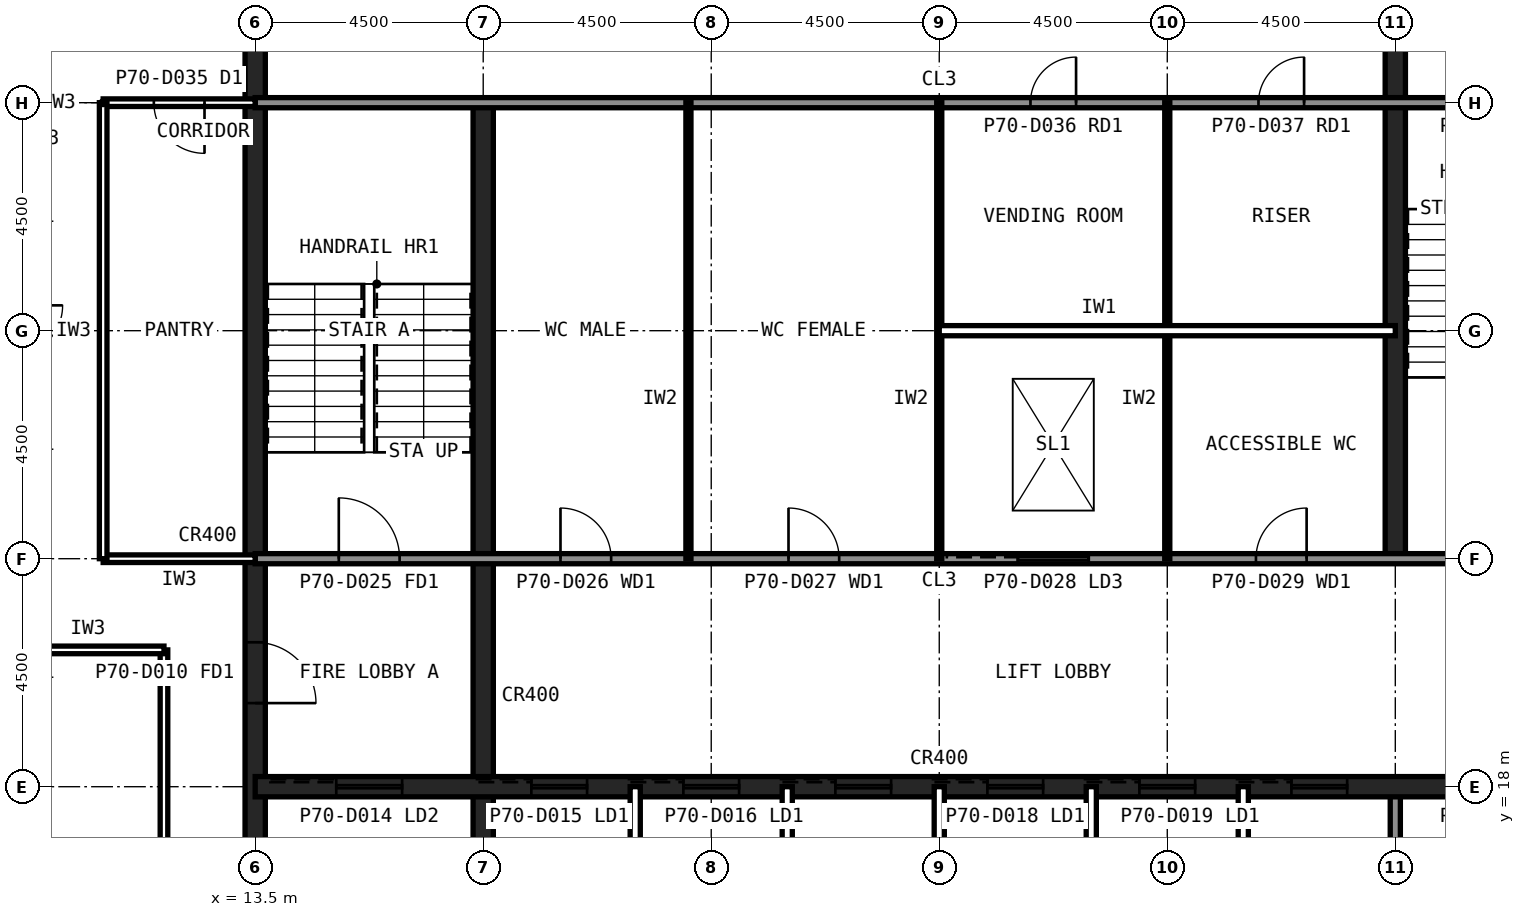
"""IFC4 building model, lengths in metres.
Left out: names, types, materials, properties, quantities, classifications, styles, units other than length and angle.
Written with IfcOpenShell. Run it as: python <this file> out.ifc"""

import sys

from ifc_helpers import new_model, si_unit, direction, frame, frame_2d, origin, place, context, subcontext, project, spatial, rectangle, extrude, element, fill, save


model = new_model("IFC4")
c1 = context("Model", 3, precision=1e-05, world=origin(), true_north=direction((0.0, 1.0)))
c2 = subcontext(c1, "Body", "Model", "MODEL_VIEW")
j1 = project(units=[si_unit("LENGTHUNIT", "METRE"), si_unit("PLANEANGLEUNIT", "RADIAN")], contexts=[c1])
p1 = place(None, origin())
s1 = spatial("IfcSite", under=j1, at=p1, CompositionType="ELEMENT")
p2 = place(p1, origin())
s2 = spatial("IfcBuilding", under=s1, at=p2, CompositionType="ELEMENT")
p3 = place(p2, frame((0.0, 0.0, 294.6)))
s3 = spatial("IfcBuildingStorey", under=s2, at=p3, CompositionType="ELEMENT", Elevation=294.6)
p4 = place(p3, frame((13.5, 40.5, 0.0), z_axis=(0.0, 0.0, 1.0), x_axis=(0.0, -1.0, 0.0)))
e1 = element("IfcWall", 1, at=p4, inside=s3, PredefinedType="SHEAR", context=c2, shape_type="SweptSolid", body=[
    extrude(rectangle(XDim=27.0, YDim=0.4, at=frame_2d((13.5, 0.0))), origin(), (0.0, 0.0, 1.0), 4.0),
])
p5 = place(p4, frame((19.65, 0.0, 0.0)))
e2 = element("IfcOpeningElement", 2, at=p5, cuts=e1, PredefinedType="OPENING", context=c2, shape_type="SweptSolid", body=[
    extrude(rectangle(XDim=1.2, YDim=2.1, at=frame_2d((0.6, 1.05))), frame((0.0, 0.21, 0.0), z_axis=(0.0, -1.0, 0.0), x_axis=(1.0, 0.0, 0.0)), (0.0, 0.0, 1.0), 0.42),
])
p6 = place(p4, frame((5.85, 0.0, 0.0)))
e3 = element("IfcOpeningElement", 3, at=p6, cuts=e1, PredefinedType="OPENING", context=c2, shape_type="SweptSolid", body=[
    extrude(rectangle(XDim=1.8, YDim=2.1, at=frame_2d((0.9, 1.05))), frame((0.0, 0.21, 0.0), z_axis=(0.0, -1.0, 0.0), x_axis=(1.0, 0.0, 0.0)), (0.0, 0.0, 1.0), 0.42),
])
p7 = place(p3, frame((18.0, 13.5, 0.0), z_axis=(0.0, 0.0, 1.0), x_axis=(0.0, 1.0, 0.0)))
e4 = element("IfcWall", 4, at=p7, inside=s3, PredefinedType="SHEAR", context=c2, shape_type="SweptSolid", body=[
    extrude(rectangle(XDim=18.0, YDim=0.4, at=frame_2d((9.0, 0.0))), origin(), (0.0, 0.0, 1.0), 4.0),
])
p8 = place(p3, frame((36.0, 13.5, 0.0), z_axis=(0.0, 0.0, 1.0), x_axis=(0.0, 1.0, 0.0)))
e5 = element("IfcWall", 5, at=p8, inside=s3, PredefinedType="SOLIDWALL", context=c2, shape_type="SweptSolid", body=[
    extrude(rectangle(XDim=4.5, YDim=0.2, at=frame_2d((2.25, 0.0))), origin(), (0.0, 0.0, 1.0), 3.84),
])
p9 = place(p3, frame((36.0, 22.5, 0.0), z_axis=(0.0, 0.0, 1.0), x_axis=(0.0, 1.0, 0.0)))
e6 = element("IfcWall", 6, at=p9, inside=s3, PredefinedType="SHEAR", context=c2, shape_type="SweptSolid", body=[
    extrude(rectangle(XDim=18.0, YDim=0.4, at=frame_2d((9.0, 0.0))), origin(), (0.0, 0.0, 1.0), 4.0),
])
p10 = place(p3, frame((13.5, 18.0, 0.0), z_axis=(0.0, 0.0, 1.0), x_axis=(1.0, 0.0, 0.0)))
e7 = element("IfcWall", 7, at=p10, inside=s3, PredefinedType="SHEAR", context=c2, shape_type="SweptSolid", body=[
    extrude(rectangle(XDim=27.0, YDim=0.4, at=frame_2d((13.5, 0.0))), origin(), (0.0, 0.0, 1.0), 4.0),
])
p11 = place(p10, frame((24.3, 0.0, 0.0)))
e8 = element("IfcOpeningElement", 8, at=p11, cuts=e7, PredefinedType="OPENING", context=c2, shape_type="SweptSolid", body=[
    extrude(rectangle(XDim=0.9, YDim=2.1, at=frame_2d((0.45, 1.05))), frame((0.0, 0.21, 0.0), z_axis=(0.0, -1.0, 0.0), x_axis=(1.0, 0.0, 0.0)), (0.0, 0.0, 1.0), 0.42),
])
p12 = place(p10, frame((5.45, 0.0, 0.0)))
e9 = element("IfcOpeningElement", 9, at=p12, cuts=e7, PredefinedType="OPENING", context=c2, shape_type="SweptSolid", body=[
    extrude(rectangle(XDim=1.1, YDim=2.1, at=frame_2d((0.55, 1.05))), frame((0.0, 0.21, 0.0), z_axis=(0.0, -1.0, 0.0), x_axis=(1.0, 0.0, 0.0)), (0.0, 0.0, 1.0), 0.42),
])
p13 = place(p10, frame((8.45, 0.0, 0.0)))
e10 = element("IfcOpeningElement", 10, at=p13, cuts=e7, PredefinedType="OPENING", context=c2, shape_type="SweptSolid", body=[
    extrude(rectangle(XDim=1.1, YDim=2.1, at=frame_2d((0.55, 1.05))), frame((0.0, 0.21, 0.0), z_axis=(0.0, -1.0, 0.0), x_axis=(1.0, 0.0, 0.0)), (0.0, 0.0, 1.0), 0.42),
])
p14 = place(p10, frame((11.45, 0.0, 0.0)))
e11 = element("IfcOpeningElement", 11, at=p14, cuts=e7, PredefinedType="OPENING", context=c2, shape_type="SweptSolid", body=[
    extrude(rectangle(XDim=1.1, YDim=2.1, at=frame_2d((0.55, 1.05))), frame((0.0, 0.21, 0.0), z_axis=(0.0, -1.0, 0.0), x_axis=(1.0, 0.0, 0.0)), (0.0, 0.0, 1.0), 0.42),
])
p15 = place(p10, frame((14.45, 0.0, 0.0)))
e12 = element("IfcOpeningElement", 12, at=p15, cuts=e7, PredefinedType="OPENING", context=c2, shape_type="SweptSolid", body=[
    extrude(rectangle(XDim=1.1, YDim=2.1, at=frame_2d((0.55, 1.05))), frame((0.0, 0.21, 0.0), z_axis=(0.0, -1.0, 0.0), x_axis=(1.0, 0.0, 0.0)), (0.0, 0.0, 1.0), 0.42),
])
p16 = place(p10, frame((17.45, 0.0, 0.0)))
e13 = element("IfcOpeningElement", 13, at=p16, cuts=e7, PredefinedType="OPENING", context=c2, shape_type="SweptSolid", body=[
    extrude(rectangle(XDim=1.1, YDim=2.1, at=frame_2d((0.55, 1.05))), frame((0.0, 0.21, 0.0), z_axis=(0.0, -1.0, 0.0), x_axis=(1.0, 0.0, 0.0)), (0.0, 0.0, 1.0), 0.42),
])
p17 = place(p10, frame((20.45, 0.0, 0.0)))
e14 = element("IfcOpeningElement", 14, at=p17, cuts=e7, PredefinedType="OPENING", context=c2, shape_type="SweptSolid", body=[
    extrude(rectangle(XDim=1.1, YDim=2.1, at=frame_2d((0.55, 1.05))), frame((0.0, 0.21, 0.0), z_axis=(0.0, -1.0, 0.0), x_axis=(1.0, 0.0, 0.0)), (0.0, 0.0, 1.0), 0.42),
])
p18 = place(p10, frame((1.6, 0.0, 0.0)))
e15 = element("IfcOpeningElement", 15, at=p18, cuts=e7, PredefinedType="OPENING", context=c2, shape_type="SweptSolid", body=[
    extrude(rectangle(XDim=1.3, YDim=2.2, at=frame_2d((0.65, 1.1))), frame((0.0, 0.21, 0.0), z_axis=(0.0, -1.0, 0.0), x_axis=(1.0, 0.0, 0.0)), (0.0, 0.0, 1.0), 0.42),
])
p19 = place(p3, frame((13.5, 22.5, 0.0), z_axis=(0.0, 0.0, 1.0), x_axis=(1.0, 0.0, 0.0)))
e16 = element("IfcWall", 16, at=p19, inside=s3, PredefinedType="SOLIDWALL", context=c2, shape_type="SweptSolid", body=[
    extrude(rectangle(XDim=27.0, YDim=0.2, at=frame_2d((13.5, 0.0))), origin(), (0.0, 0.0, 1.0), 3.84),
])
p20 = place(p19, frame((1.65, 0.0, 0.0)))
e17 = element("IfcOpeningElement", 17, at=p20, cuts=e16, PredefinedType="OPENING", context=c2, shape_type="SweptSolid", body=[
    extrude(rectangle(XDim=1.2, YDim=2.1, at=frame_2d((0.6, 1.05))), frame((0.0, 0.11, 0.0), z_axis=(0.0, -1.0, 0.0), x_axis=(1.0, 0.0, 0.0)), (0.0, 0.0, 1.0), 0.22),
])
p21 = place(p19, frame((6.025, 0.0, 0.0)))
e18 = element("IfcOpeningElement", 18, at=p21, cuts=e16, PredefinedType="OPENING", context=c2, shape_type="SweptSolid", body=[
    extrude(rectangle(XDim=1.0, YDim=2.1, at=frame_2d((0.5, 1.05))), frame((0.0, 0.11, 0.0), z_axis=(0.0, -1.0, 0.0), x_axis=(1.0, 0.0, 0.0)), (0.0, 0.0, 1.0), 0.22),
])
p22 = place(p19, frame((10.525, 0.0, 0.0)))
e19 = element("IfcOpeningElement", 19, at=p22, cuts=e16, PredefinedType="OPENING", context=c2, shape_type="SweptSolid", body=[
    extrude(rectangle(XDim=1.0, YDim=2.1, at=frame_2d((0.5, 1.05))), frame((0.0, 0.11, 0.0), z_axis=(0.0, -1.0, 0.0), x_axis=(1.0, 0.0, 0.0)), (0.0, 0.0, 1.0), 0.22),
])
p23 = place(p19, frame((19.75, 0.0, 0.0)))
e20 = element("IfcOpeningElement", 20, at=p23, cuts=e16, PredefinedType="OPENING", context=c2, shape_type="SweptSolid", body=[
    extrude(rectangle(XDim=1.0, YDim=2.1, at=frame_2d((0.5, 1.05))), frame((0.0, 0.11, 0.0), z_axis=(0.0, -1.0, 0.0), x_axis=(1.0, 0.0, 0.0)), (0.0, 0.0, 1.0), 0.22),
])
p24 = place(p19, frame((15.05, 0.0, 0.0)))
e21 = element("IfcOpeningElement", 21, at=p24, cuts=e16, PredefinedType="OPENING", context=c2, shape_type="SweptSolid", body=[
    extrude(rectangle(XDim=1.4, YDim=2.4, at=frame_2d((0.7, 1.2))), frame((0.0, 0.11, 0.0), z_axis=(0.0, -1.0, 0.0), x_axis=(1.0, 0.0, 0.0)), (0.0, 0.0, 1.0), 0.22),
])
p25 = place(p3, frame((13.5, 31.5, 0.0), z_axis=(0.0, 0.0, 1.0), x_axis=(1.0, 0.0, 0.0)))
e22 = element("IfcWall", 22, at=p25, inside=s3, PredefinedType="SOLIDWALL", context=c2, shape_type="SweptSolid", body=[
    extrude(rectangle(XDim=27.0, YDim=0.2, at=frame_2d((13.5, 0.0))), origin(), (0.0, 0.0, 1.0), 3.84),
])
p26 = place(p25, frame((24.15, 0.0, 0.0)))
e23 = element("IfcOpeningElement", 23, at=p26, cuts=e22, PredefinedType="OPENING", context=c2, shape_type="SweptSolid", body=[
    extrude(rectangle(XDim=1.2, YDim=2.1, at=frame_2d((0.6, 1.05))), frame((0.0, 0.11, 0.0), z_axis=(0.0, -1.0, 0.0), x_axis=(1.0, 0.0, 0.0)), (0.0, 0.0, 1.0), 0.22),
])
p27 = place(p25, frame((15.3, 0.0, 0.0)))
e24 = element("IfcOpeningElement", 24, at=p27, cuts=e22, PredefinedType="OPENING", context=c2, shape_type="SweptSolid", body=[
    extrude(rectangle(XDim=0.9, YDim=2.1, at=frame_2d((0.45, 1.05))), frame((0.0, 0.11, 0.0), z_axis=(0.0, -1.0, 0.0), x_axis=(1.0, 0.0, 0.0)), (0.0, 0.0, 1.0), 0.22),
])
p28 = place(p25, frame((19.8, 0.0, 0.0)))
e25 = element("IfcOpeningElement", 25, at=p28, cuts=e22, PredefinedType="OPENING", context=c2, shape_type="SweptSolid", body=[
    extrude(rectangle(XDim=0.9, YDim=2.1, at=frame_2d((0.45, 1.05))), frame((0.0, 0.11, 0.0), z_axis=(0.0, -1.0, 0.0), x_axis=(1.0, 0.0, 0.0)), (0.0, 0.0, 1.0), 0.22),
])
for number, where, z_axis, x_axis in (
    (26, (21.0, 13.5, 0.0), (0.0, 0.0, 1.0), (0.0, 1.0, 0.0)),
    (27, (24.0, 13.5, 0.0), (0.0, 0.0, 1.0), (0.0, 1.0, 0.0)),
    (28, (27.0, 13.5, 0.0), (0.0, 0.0, 1.0), (0.0, 1.0, 0.0)),
    (29, (30.0, 13.5, 0.0), (0.0, 0.0, 1.0), (0.0, 1.0, 0.0)),
    (30, (33.0, 13.5, 0.0), (0.0, 0.0, 1.0), (0.0, 1.0, 0.0)),
):
    element("IfcWall", number, at=place(p3, frame(where, z_axis=z_axis, x_axis=x_axis)), inside=s3, PredefinedType="PARTITIONING", context=c2, shape_type="SweptSolid", body=[
        extrude(rectangle(XDim=4.5, YDim=0.2, at=frame_2d((2.25, 0.0))), origin(), (0.0, 0.0, 1.0), 3.84),
    ])
for number, where, z_axis, x_axis in (
    (31, (22.05, 22.5, 0.0), (0.0, 0.0, 1.0), (0.0, 1.0, 0.0)),
    (32, (27.0, 22.5, 0.0), (0.0, 0.0, 1.0), (0.0, 1.0, 0.0)),
    (33, (31.5, 22.5, 0.0), (0.0, 0.0, 1.0), (0.0, 1.0, 0.0)),
):
    element("IfcWall", number, at=place(p3, frame(where, z_axis=z_axis, x_axis=x_axis)), inside=s3, PredefinedType="PLUMBINGWALL", context=c2, shape_type="SweptSolid", body=[
        extrude(rectangle(XDim=9.0, YDim=0.1, at=frame_2d((4.5, 0.0))), origin(), (0.0, 0.0, 1.0), 3.84),
    ])
p29 = place(p3, frame((27.0, 27.0, 0.0), z_axis=(0.0, 0.0, 1.0), x_axis=(1.0, 0.0, 0.0)))
e34 = element("IfcWall", 34, at=p29, inside=s3, PredefinedType="PARTITIONING", context=c2, shape_type="SweptSolid", body=[
    extrude(rectangle(XDim=9.0, YDim=0.2, at=frame_2d((4.5, 0.0))), origin(), (0.0, 0.0, 1.0), 3.84),
])
p30 = place(p3, frame((11.7, 20.7, 0.0), z_axis=(0.0, 0.0, 1.0), x_axis=(0.0, -1.0, 0.0)))
e35 = element("IfcWall", 35, at=p30, inside=s3, PredefinedType="PARTITIONING", context=c2, shape_type="SweptSolid", body=[
    extrude(rectangle(XDim=9.0, YDim=0.15, at=frame_2d((4.5, 0.0))), origin(), (0.0, 0.0, 1.0), 3.84),
])
p31 = place(p3, frame((8.7, 20.7, 0.0), z_axis=(0.0, 0.0, 1.0), x_axis=(1.0, 0.0, 0.0)))
e36 = element("IfcWall", 36, at=p31, inside=s3, PredefinedType="PARTITIONING", context=c2, shape_type="SweptSolid", body=[
    extrude(rectangle(XDim=3.0, YDim=0.15, at=frame_2d((1.5, 0.0))), origin(), (0.0, 0.0, 1.0), 3.84),
])
p32 = place(p3, frame((10.5, 22.5, 0.0), z_axis=(0.0, 0.0, 1.0), x_axis=(1.0, 0.0, 0.0)))
e37 = element("IfcWall", 37, at=p32, inside=s3, PredefinedType="PARTITIONING", context=c2, shape_type="SweptSolid", body=[
    extrude(rectangle(XDim=3.0, YDim=0.15, at=frame_2d((1.5, 0.0))), origin(), (0.0, 0.0, 1.0), 2.989),
])
p33 = place(p3, frame((13.5, 31.5, 0.0), z_axis=(0.0, 0.0, 1.0), x_axis=(-1.0, 0.0, 0.0)))
e38 = element("IfcWall", 38, at=p33, inside=s3, PredefinedType="PARTITIONING", context=c2, shape_type="SweptSolid", body=[
    extrude(rectangle(XDim=3.0, YDim=0.15, at=frame_2d((1.5, 0.0))), origin(), (0.0, 0.0, 1.0), 2.989),
])
p34 = place(p33, frame((1.0, 0.0, 0.0)))
e39 = element("IfcOpeningElement", 39, at=p34, cuts=e38, PredefinedType="OPENING", context=c2, shape_type="SweptSolid", body=[
    extrude(rectangle(XDim=1.0, YDim=2.1, at=frame_2d((0.5, 1.05))), frame((0.0, 0.085, 0.0), z_axis=(0.0, -1.0, 0.0), x_axis=(1.0, 0.0, 0.0)), (0.0, 0.0, 1.0), 0.17),
])
p35 = place(p3, frame((10.5, 31.5, 0.0), z_axis=(0.0, 0.0, 1.0), x_axis=(0.0, -1.0, 0.0)))
e40 = element("IfcWall", 40, at=p35, inside=s3, PredefinedType="PARTITIONING", context=c2, shape_type="SweptSolid", body=[
    extrude(rectangle(XDim=9.0, YDim=0.15, at=frame_2d((4.5, 0.0))), origin(), (0.0, 0.0, 1.0), 3.84),
])
p36 = place(p5, origin())
e41 = element("IfcDoor", 41, at=p36, inside=s3, OperationType="SINGLE_SWING_RIGHT", PredefinedType="DOOR", context=c2, shape_type="SweptSolid", body=[
    extrude(rectangle(XDim=1.2, YDim=2.1, at=frame_2d((0.6, 1.05))), frame((0.0, 0.025, 0.0), z_axis=(0.0, -1.0, 0.0), x_axis=(1.0, 0.0, 0.0)), (0.0, 0.0, 1.0), 0.05),
])
fill(e2, e41)
p37 = place(p20, origin())
e42 = element("IfcDoor", 42, at=p37, inside=s3, OperationType="SINGLE_SWING_LEFT", PredefinedType="DOOR", context=c2, shape_type="SweptSolid", body=[
    extrude(rectangle(XDim=1.2, YDim=2.1, at=frame_2d((0.6, 1.05))), frame((0.0, 0.025, 0.0), z_axis=(0.0, -1.0, 0.0), x_axis=(1.0, 0.0, 0.0)), (0.0, 0.0, 1.0), 0.05),
])
fill(e17, e42)
p38 = place(p21, origin())
e43 = element("IfcDoor", 43, at=p38, inside=s3, OperationType="SINGLE_SWING_LEFT", PredefinedType="DOOR", context=c2, shape_type="SweptSolid", body=[
    extrude(rectangle(XDim=1.0, YDim=2.1, at=frame_2d((0.5, 1.05))), frame((0.0, 0.025, 0.0), z_axis=(0.0, -1.0, 0.0), x_axis=(1.0, 0.0, 0.0)), (0.0, 0.0, 1.0), 0.05),
])
fill(e18, e43)
p39 = place(p22, origin())
e44 = element("IfcDoor", 44, at=p39, inside=s3, OperationType="SINGLE_SWING_LEFT", PredefinedType="DOOR", context=c2, shape_type="SweptSolid", body=[
    extrude(rectangle(XDim=1.0, YDim=2.1, at=frame_2d((0.5, 1.05))), frame((0.0, 0.025, 0.0), z_axis=(0.0, -1.0, 0.0), x_axis=(1.0, 0.0, 0.0)), (0.0, 0.0, 1.0), 0.05),
])
fill(e19, e44)
p40 = place(p23, origin())
e45 = element("IfcDoor", 45, at=p40, inside=s3, OperationType="SINGLE_SWING_RIGHT", PredefinedType="DOOR", context=c2, shape_type="SweptSolid", body=[
    extrude(rectangle(XDim=1.0, YDim=2.1, at=frame_2d((0.5, 1.05))), frame((0.0, 0.025, 0.0), z_axis=(0.0, -1.0, 0.0), x_axis=(1.0, 0.0, 0.0)), (0.0, 0.0, 1.0), 0.05),
])
fill(e20, e45)
p41 = place(p27, origin())
e46 = element("IfcDoor", 46, at=p41, inside=s3, OperationType="SINGLE_SWING_RIGHT", PredefinedType="DOOR", context=c2, shape_type="SweptSolid", body=[
    extrude(rectangle(XDim=0.9, YDim=2.1, at=frame_2d((0.45, 1.05))), frame((0.0, 0.025, 0.0), z_axis=(0.0, -1.0, 0.0), x_axis=(1.0, 0.0, 0.0)), (0.0, 0.0, 1.0), 0.05),
])
fill(e24, e46)
p42 = place(p28, origin())
e47 = element("IfcDoor", 47, at=p42, inside=s3, OperationType="SINGLE_SWING_RIGHT", PredefinedType="DOOR", context=c2, shape_type="SweptSolid", body=[
    extrude(rectangle(XDim=0.9, YDim=2.1, at=frame_2d((0.45, 1.05))), frame((0.0, 0.025, 0.0), z_axis=(0.0, -1.0, 0.0), x_axis=(1.0, 0.0, 0.0)), (0.0, 0.0, 1.0), 0.05),
])
fill(e25, e47)
p43 = place(p12, origin())
e48 = element("IfcDoor", 48, at=p43, inside=s3, OperationType="SLIDING_TO_LEFT", PredefinedType="DOOR", context=c2, shape_type="SweptSolid", body=[
    extrude(rectangle(XDim=1.1, YDim=2.1, at=frame_2d((0.55, 1.05))), frame((0.0, 0.025, 0.0), z_axis=(0.0, -1.0, 0.0), x_axis=(1.0, 0.0, 0.0)), (0.0, 0.0, 1.0), 0.05),
])
fill(e9, e48)
p44 = place(p13, origin())
e49 = element("IfcDoor", 49, at=p44, inside=s3, OperationType="SLIDING_TO_LEFT", PredefinedType="DOOR", context=c2, shape_type="SweptSolid", body=[
    extrude(rectangle(XDim=1.1, YDim=2.1, at=frame_2d((0.55, 1.05))), frame((0.0, 0.025, 0.0), z_axis=(0.0, -1.0, 0.0), x_axis=(1.0, 0.0, 0.0)), (0.0, 0.0, 1.0), 0.05),
])
fill(e10, e49)
p45 = place(p14, origin())
e50 = element("IfcDoor", 50, at=p45, inside=s3, OperationType="SLIDING_TO_LEFT", PredefinedType="DOOR", context=c2, shape_type="SweptSolid", body=[
    extrude(rectangle(XDim=1.1, YDim=2.1, at=frame_2d((0.55, 1.05))), frame((0.0, 0.025, 0.0), z_axis=(0.0, -1.0, 0.0), x_axis=(1.0, 0.0, 0.0)), (0.0, 0.0, 1.0), 0.05),
])
fill(e11, e50)
p46 = place(p15, origin())
e51 = element("IfcDoor", 51, at=p46, inside=s3, OperationType="SLIDING_TO_LEFT", PredefinedType="DOOR", context=c2, shape_type="SweptSolid", body=[
    extrude(rectangle(XDim=1.1, YDim=2.1, at=frame_2d((0.55, 1.05))), frame((0.0, 0.025, 0.0), z_axis=(0.0, -1.0, 0.0), x_axis=(1.0, 0.0, 0.0)), (0.0, 0.0, 1.0), 0.05),
])
fill(e12, e51)
p47 = place(p16, origin())
e52 = element("IfcDoor", 52, at=p47, inside=s3, OperationType="SLIDING_TO_LEFT", PredefinedType="DOOR", context=c2, shape_type="SweptSolid", body=[
    extrude(rectangle(XDim=1.1, YDim=2.1, at=frame_2d((0.55, 1.05))), frame((0.0, 0.025, 0.0), z_axis=(0.0, -1.0, 0.0), x_axis=(1.0, 0.0, 0.0)), (0.0, 0.0, 1.0), 0.05),
])
fill(e13, e52)
p48 = place(p17, origin())
e53 = element("IfcDoor", 53, at=p48, inside=s3, OperationType="SLIDING_TO_LEFT", PredefinedType="DOOR", context=c2, shape_type="SweptSolid", body=[
    extrude(rectangle(XDim=1.1, YDim=2.1, at=frame_2d((0.55, 1.05))), frame((0.0, 0.025, 0.0), z_axis=(0.0, -1.0, 0.0), x_axis=(1.0, 0.0, 0.0)), (0.0, 0.0, 1.0), 0.05),
])
fill(e14, e53)
p49 = place(p18, origin())
e54 = element("IfcDoor", 54, at=p49, inside=s3, OperationType="SLIDING_TO_LEFT", PredefinedType="DOOR", context=c2, shape_type="SweptSolid", body=[
    extrude(rectangle(XDim=1.3, YDim=2.2, at=frame_2d((0.65, 1.1))), frame((0.0, 0.025, 0.0), z_axis=(0.0, -1.0, 0.0), x_axis=(1.0, 0.0, 0.0)), (0.0, 0.0, 1.0), 0.05),
])
fill(e15, e54)
p50 = place(p24, origin())
e55 = element("IfcDoor", 55, at=p50, inside=s3, OperationType="SLIDING_TO_LEFT", PredefinedType="DOOR", context=c2, shape_type="SweptSolid", body=[
    extrude(rectangle(XDim=1.4, YDim=2.4, at=frame_2d((0.7, 1.2))), frame((0.0, 0.025, 0.0), z_axis=(0.0, -1.0, 0.0), x_axis=(1.0, 0.0, 0.0)), (0.0, 0.0, 1.0), 0.05),
])
fill(e21, e55)
p51 = place(p34, origin())
e56 = element("IfcDoor", 56, at=p51, inside=s3, OperationType="SINGLE_SWING_LEFT", PredefinedType="DOOR", context=c2, shape_type="SweptSolid", body=[
    extrude(rectangle(XDim=1.0, YDim=2.1, at=frame_2d((0.5, 1.05))), frame((0.0, 0.025, 0.0), z_axis=(0.0, -1.0, 0.0), x_axis=(1.0, 0.0, 0.0)), (0.0, 0.0, 1.0), 0.05),
])
fill(e39, e56)
save(model, sys.argv[1])
